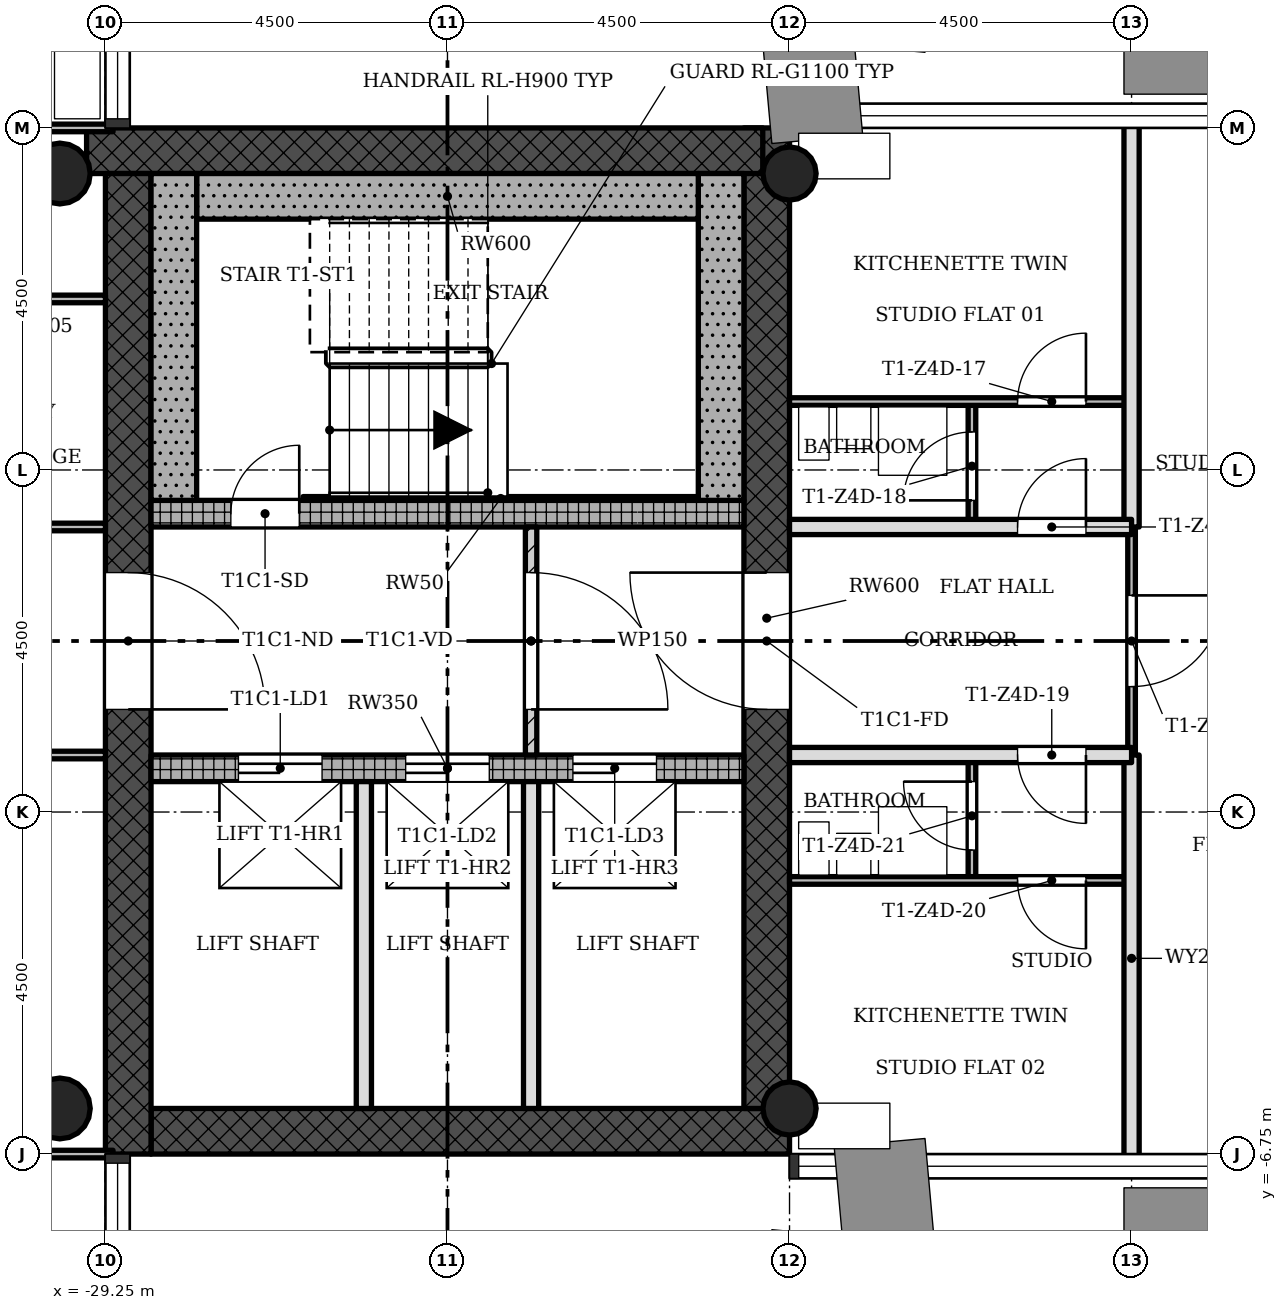
"""IFC4 building model, lengths in metres.
Left out: names, types, materials, properties, quantities, classifications, styles, units other than length and angle.
Written with IfcOpenShell. Run it as: python <this file> out.ifc"""

import sys

from ifc_helpers import new_model, si_unit, direction, frame, frame_2d, origin, origin_2d, place, context, subcontext, project, spatial, rectangle, hollow_circle, extrude, element, fill, save


model = new_model("IFC4")
c1 = context("Model", 3, precision=1e-05, world=origin(), true_north=direction((0.0, 1.0)))
c2 = subcontext(c1, "Body", "Model", "MODEL_VIEW")
j1 = project(units=[si_unit("LENGTHUNIT", "METRE"), si_unit("PLANEANGLEUNIT", "RADIAN")], contexts=[c1])
p1 = place(None, origin())
s1 = spatial("IfcSite", under=j1, at=p1, CompositionType="ELEMENT")
p2 = place(p1, origin())
s2 = spatial("IfcBuilding", under=s1, at=p2, CompositionType="ELEMENT")
p3 = place(p2, frame((0.0, 0.0, 202.8)))
s3 = spatial("IfcBuildingStorey", under=s2, at=p3, CompositionType="ELEMENT", Elevation=202.8)
p4 = place(p3, frame((-28.65, -6.45, 0.0), z_axis=(0.0, 0.0, 1.0), x_axis=(1.0, 0.0, 0.0)))
e1 = element("IfcWall", 1, at=p4, inside=s3, PredefinedType="SHEAR", context=c2, shape_type="SweptSolid", body=[
    extrude(rectangle(XDim=8.4, YDim=0.6, at=frame_2d((4.2, 0.0))), origin(), (0.0, 0.0, 1.0), 3.4),
])
p5 = place(p3, frame((-20.55, -6.15, 0.0), z_axis=(0.0, 0.0, 1.0), x_axis=(0.0, 1.0, 0.0)))
e2 = element("IfcWall", 2, at=p5, inside=s3, PredefinedType="SHEAR", context=c2, shape_type="SweptSolid", body=[
    extrude(rectangle(XDim=12.9, YDim=0.6, at=frame_2d((6.45, 0.0))), origin(), (0.0, 0.0, 1.0), 3.4),
])
p6 = place(p5, frame((5.25, 0.0, 0.0)))
e3 = element("IfcOpeningElement", 3, at=p6, cuts=e2, PredefinedType="OPENING", context=c2, shape_type="SweptSolid", body=[
    extrude(rectangle(XDim=1.8, YDim=2.1, at=frame_2d((0.9, 1.05))), frame((0.0, 0.31, 0.0), z_axis=(0.0, -1.0, 0.0), x_axis=(1.0, 0.0, 0.0)), (0.0, 0.0, 1.0), 0.62),
])
p7 = place(p3, frame((-20.602, 6.45, 0.0), z_axis=(0.0, 0.0, 1.0), x_axis=(-1.0, 0.0, 0.0)))
e4 = element("IfcWall", 4, at=p7, inside=s3, PredefinedType="SHEAR", context=c2, shape_type="SweptSolid", body=[
    extrude(rectangle(XDim=8.896, YDim=0.6, at=frame_2d((4.448, 0.0))), origin(), (0.0, 0.0, 1.0), 3.4),
])
p8 = place(p3, frame((-28.95, 6.15, 0.0), z_axis=(0.0, 0.0, 1.0), x_axis=(0.0, -1.0, 0.0)))
e5 = element("IfcWall", 5, at=p8, inside=s3, PredefinedType="SHEAR", context=c2, shape_type="SweptSolid", body=[
    extrude(rectangle(XDim=12.9, YDim=0.6, at=frame_2d((6.45, 0.0))), origin(), (0.0, 0.0, 1.0), 3.4),
])
p9 = place(p8, frame((5.25, 0.0, 0.0)))
e6 = element("IfcOpeningElement", 6, at=p9, cuts=e5, PredefinedType="OPENING", context=c2, shape_type="SweptSolid", body=[
    extrude(rectangle(XDim=1.8, YDim=2.1, at=frame_2d((0.9, 1.05))), frame((0.0, 0.31, 0.0), z_axis=(0.0, -1.0, 0.0), x_axis=(1.0, 0.0, 0.0)), (0.0, 0.0, 1.0), 0.62),
])
p10 = place(p3, frame((-28.65, -1.675, 0.0), z_axis=(0.0, 0.0, 1.0), x_axis=(1.0, 0.0, 0.0)))
e7 = element("IfcWall", 7, at=p10, inside=s3, PredefinedType="SHEAR", context=c2, shape_type="SweptSolid", body=[
    extrude(rectangle(XDim=7.8, YDim=0.35, at=frame_2d((3.9, 0.0))), origin(), (0.0, 0.0, 1.0), 3.4),
])
p11 = place(p10, frame((1.15, 0.0, 0.0)))
e8 = element("IfcOpeningElement", 8, at=p11, cuts=e7, PredefinedType="OPENING", context=c2, shape_type="SweptSolid", body=[
    extrude(rectangle(XDim=1.1, YDim=2.1, at=frame_2d((0.55, 1.05))), frame((0.0, 0.185, 0.0), z_axis=(0.0, -1.0, 0.0), x_axis=(1.0, 0.0, 0.0)), (0.0, 0.0, 1.0), 0.37),
])
p12 = place(p10, frame((3.35, 0.0, 0.0)))
e9 = element("IfcOpeningElement", 9, at=p12, cuts=e7, PredefinedType="OPENING", context=c2, shape_type="SweptSolid", body=[
    extrude(rectangle(XDim=1.1, YDim=2.1, at=frame_2d((0.55, 1.05))), frame((0.0, 0.185, 0.0), z_axis=(0.0, -1.0, 0.0), x_axis=(1.0, 0.0, 0.0)), (0.0, 0.0, 1.0), 0.37),
])
p13 = place(p10, frame((5.55, 0.0, 0.0)))
e10 = element("IfcOpeningElement", 10, at=p13, cuts=e7, PredefinedType="OPENING", context=c2, shape_type="SweptSolid", body=[
    extrude(rectangle(XDim=1.1, YDim=2.1, at=frame_2d((0.55, 1.05))), frame((0.0, 0.185, 0.0), z_axis=(0.0, -1.0, 0.0), x_axis=(1.0, 0.0, 0.0)), (0.0, 0.0, 1.0), 0.37),
])
p14 = place(p3, frame((-28.65, 1.675, 0.0), z_axis=(0.0, 0.0, 1.0), x_axis=(1.0, 0.0, 0.0)))
e11 = element("IfcWall", 11, at=p14, inside=s3, PredefinedType="SHEAR", context=c2, shape_type="SweptSolid", body=[
    extrude(rectangle(XDim=7.8, YDim=0.35, at=frame_2d((3.9, 0.0))), origin(), (0.0, 0.0, 1.0), 3.4),
])
p15 = place(p14, frame((1.05, 0.0, 0.0)))
e12 = element("IfcOpeningElement", 12, at=p15, cuts=e11, PredefinedType="OPENING", context=c2, shape_type="SweptSolid", body=[
    extrude(rectangle(XDim=0.9, YDim=2.1, at=frame_2d((0.45, 1.05))), frame((0.0, 0.185, 0.0), z_axis=(0.0, -1.0, 0.0), x_axis=(1.0, 0.0, 0.0)), (0.0, 0.0, 1.0), 0.37),
])
for number, where, z_axis, x_axis in (
    (13, (-20.25, -6.15, 0.0), (0.0, 0.0, 1.0), (1.0, 0.0, 0.0)),
    (14, (-20.25, 6.15, 0.0), (0.0, 0.0, 1.0), (1.0, 0.0, 0.0)),
):
    element("IfcColumn", number, at=place(p3, frame(where, z_axis=z_axis, x_axis=x_axis)), inside=s3, PredefinedType="COLUMN", context=c2, shape_type="SweptSolid", body=[
        extrude(hollow_circle(Radius=0.35, WallThickness=0.025, at=origin_2d()), origin(), (0.0, 0.0, 1.0), 3.4),
    ])
for number, where, z_axis, x_axis in (
    (15, (-29.85, -6.15, 0.0), (0.0, 0.0, 1.0), (1.0, 0.0, 0.0)),
    (16, (-29.85, 6.15, 0.0), (0.0, 0.0, 1.0), (1.0, 0.0, 0.0)),
):
    element("IfcColumn", number, at=place(p3, frame(where, z_axis=z_axis, x_axis=x_axis)), inside=s3, PredefinedType="COLUMN", context=c2, shape_type="SweptSolid", body=[
        extrude(hollow_circle(Radius=0.4, WallThickness=0.028, at=origin_2d()), origin(), (0.0, 0.0, 1.0), 3.4),
    ])
p16 = place(p3, frame((-23.65, -1.5, 0.0), z_axis=(0.0, 0.0, 1.0), x_axis=(0.0, 1.0, 0.0)))
e17 = element("IfcWall", 17, at=p16, inside=s3, PredefinedType="PARTITIONING", context=c2, shape_type="SweptSolid", body=[
    extrude(rectangle(XDim=3.0, YDim=0.15, at=frame_2d((1.5, 0.0))), origin(), (0.0, 0.0, 1.0), 3.0),
])
p17 = place(p16, frame((0.6, 0.0, 0.0)))
e18 = element("IfcOpeningElement", 18, at=p17, cuts=e17, PredefinedType="OPENING", context=c2, shape_type="SweptSolid", body=[
    extrude(rectangle(XDim=1.8, YDim=2.1, at=frame_2d((0.9, 1.05))), frame((0.0, 0.085, 0.0), z_axis=(0.0, -1.0, 0.0), x_axis=(1.0, 0.0, 0.0)), (0.0, 0.0, 1.0), 0.17),
])
for number, where, z_axis, x_axis in (
    (19, (-25.85, -6.15, 0.0), (0.0, 0.0, 1.0), (0.0, 1.0, 0.0)),
    (20, (-23.65, -6.15, 0.0), (0.0, 0.0, 1.0), (0.0, 1.0, 0.0)),
):
    element("IfcWall", number, at=place(p3, frame(where, z_axis=z_axis, x_axis=x_axis)), inside=s3, PredefinedType="SOLIDWALL", context=c2, shape_type="SweptSolid", body=[
        extrude(rectangle(XDim=4.3, YDim=0.2, at=frame_2d((2.15, 0.0))), origin(), (0.0, 0.0, 1.0), 3.0),
    ])
p18 = place(p3, frame((-17.85, -3.15, 0.0), z_axis=(0.0, 0.0, 1.0), x_axis=(0.0, 1.0, 0.0)))
e21 = element("IfcWall", 21, at=p18, inside=s3, PredefinedType="PARTITIONING", context=c2, shape_type="SweptSolid", body=[
    extrude(rectangle(XDim=1.65, YDim=0.1, at=frame_2d((0.825, 0.0))), origin(), (0.0, 0.0, 1.0), 3.0),
])
p19 = place(p18, frame((0.4, 0.0, 0.0)))
e22 = element("IfcOpeningElement", 22, at=p19, cuts=e21, PredefinedType="OPENING", context=c2, shape_type="SweptSolid", body=[
    extrude(rectangle(XDim=0.9, YDim=2.1, at=frame_2d((0.45, 1.05))), frame((0.0, 0.06, 0.0), z_axis=(0.0, -1.0, 0.0), x_axis=(1.0, 0.0, 0.0)), (0.0, 0.0, 1.0), 0.12),
])
p20 = place(p3, frame((-17.85, 1.5, 0.0), z_axis=(0.0, 0.0, 1.0), x_axis=(0.0, 1.0, 0.0)))
e23 = element("IfcWall", 23, at=p20, inside=s3, PredefinedType="PARTITIONING", context=c2, shape_type="SweptSolid", body=[
    extrude(rectangle(XDim=1.65, YDim=0.1, at=frame_2d((0.825, 0.0))), origin(), (0.0, 0.0, 1.0), 3.0),
])
p21 = place(p20, frame((0.35, 0.0, 0.0)))
e24 = element("IfcOpeningElement", 24, at=p21, cuts=e23, PredefinedType="OPENING", context=c2, shape_type="SweptSolid", body=[
    extrude(rectangle(XDim=0.9, YDim=2.1, at=frame_2d((0.45, 1.05))), frame((0.0, 0.06, 0.0), z_axis=(0.0, -1.0, 0.0), x_axis=(1.0, 0.0, 0.0)), (0.0, 0.0, 1.0), 0.12),
])
p22 = place(p3, frame((-15.75, -1.5, 0.0), z_axis=(0.0, 0.0, 1.0), x_axis=(0.0, 1.0, 0.0)))
e25 = element("IfcWall", 25, at=p22, inside=s3, PredefinedType="PARTITIONING", context=c2, shape_type="SweptSolid", body=[
    extrude(rectangle(XDim=3.0, YDim=0.1, at=frame_2d((1.5, 0.0))), origin(), (0.0, 0.0, 1.0), 3.0),
])
p23 = place(p22, frame((0.9, 0.0, 0.0)))
e26 = element("IfcOpeningElement", 26, at=p23, cuts=e25, PredefinedType="OPENING", context=c2, shape_type="SweptSolid", body=[
    extrude(rectangle(XDim=1.2, YDim=2.1, at=frame_2d((0.6, 1.05))), frame((0.0, 0.06, 0.0), z_axis=(0.0, -1.0, 0.0), x_axis=(1.0, 0.0, 0.0)), (0.0, 0.0, 1.0), 0.12),
])
for number, where, z_axis, x_axis in (
    (27, (-15.75, -6.85, 0.0), (0.0, 0.0, 1.0), (0.0, 1.0, 0.0)),
    (28, (-15.75, 1.5, 0.0), (0.0, 0.0, 1.0), (0.0, 1.0, 0.0)),
):
    element("IfcWall", number, at=place(p3, frame(where, z_axis=z_axis, x_axis=x_axis)), inside=s3, PredefinedType="SOLIDWALL", context=c2, shape_type="SweptSolid", body=[
        extrude(rectangle(XDim=5.35, YDim=0.2, at=frame_2d((2.675, 0.0))), origin(), (0.0, 0.0, 1.0), 3.0),
    ])
p24 = place(p3, frame((-35.1, -6.75, 0.0), z_axis=(0.0, 0.0, 1.0), x_axis=(1.0, 0.0, 0.0)))
e29 = element("IfcWall", 29, at=p24, inside=s3, PredefinedType="PARTITIONING", context=c2, shape_type="SweptSolid", body=[
    extrude(rectangle(XDim=5.95, YDim=0.1, at=frame_2d((2.975, 0.0))), origin(), (0.0, 0.0, 1.0), 3.0),
])
p25 = place(p3, frame((-20.25, -3.15, 0.0), z_axis=(0.0, 0.0, 1.0), x_axis=(1.0, 0.0, 0.0)))
e30 = element("IfcWall", 30, at=p25, inside=s3, PredefinedType="PARTITIONING", context=c2, shape_type="SweptSolid", body=[
    extrude(rectangle(XDim=4.5, YDim=0.1, at=frame_2d((2.25, 0.0))), origin(), (0.0, 0.0, 1.0), 3.0),
])
p26 = place(p25, frame((3.0, 0.0, 0.0)))
e31 = element("IfcOpeningElement", 31, at=p26, cuts=e30, PredefinedType="OPENING", context=c2, shape_type="SweptSolid", body=[
    extrude(rectangle(XDim=0.9, YDim=2.1, at=frame_2d((0.45, 1.05))), frame((0.0, 0.06, 0.0), z_axis=(0.0, -1.0, 0.0), x_axis=(1.0, 0.0, 0.0)), (0.0, 0.0, 1.0), 0.12),
])
p27 = place(p3, frame((-31.5, -1.5, 0.0), z_axis=(0.0, 0.0, 1.0), x_axis=(1.0, 0.0, 0.0)))
e32 = element("IfcWall", 32, at=p27, inside=s3, PredefinedType="PARTITIONING", context=c2, shape_type="SweptSolid", body=[
    extrude(rectangle(XDim=2.25, YDim=0.1, at=frame_2d((1.125, 0.0))), origin(), (0.0, 0.0, 1.0), 3.0),
])
p28 = place(p3, frame((-20.25, -1.5, 0.0), z_axis=(0.0, 0.0, 1.0), x_axis=(1.0, 0.0, 0.0)))
e33 = element("IfcWall", 33, at=p28, inside=s3, PredefinedType="SOLIDWALL", context=c2, shape_type="SweptSolid", body=[
    extrude(rectangle(XDim=4.5, YDim=0.2, at=frame_2d((2.25, 0.0))), origin(), (0.0, 0.0, 1.0), 3.0),
])
p29 = place(p28, frame((3.0, 0.0, 0.0)))
e34 = element("IfcOpeningElement", 34, at=p29, cuts=e33, PredefinedType="OPENING", context=c2, shape_type="SweptSolid", body=[
    extrude(rectangle(XDim=0.9, YDim=2.1, at=frame_2d((0.45, 1.05))), frame((0.0, 0.11, 0.0), z_axis=(0.0, -1.0, 0.0), x_axis=(1.0, 0.0, 0.0)), (0.0, 0.0, 1.0), 0.22),
])
p30 = place(p3, frame((-31.5, 1.5, 0.0), z_axis=(0.0, 0.0, 1.0), x_axis=(1.0, 0.0, 0.0)))
e35 = element("IfcWall", 35, at=p30, inside=s3, PredefinedType="PARTITIONING", context=c2, shape_type="SweptSolid", body=[
    extrude(rectangle(XDim=2.25, YDim=0.1, at=frame_2d((1.125, 0.0))), origin(), (0.0, 0.0, 1.0), 3.0),
])
p31 = place(p3, frame((-20.25, 1.5, 0.0), z_axis=(0.0, 0.0, 1.0), x_axis=(1.0, 0.0, 0.0)))
e36 = element("IfcWall", 36, at=p31, inside=s3, PredefinedType="SOLIDWALL", context=c2, shape_type="SweptSolid", body=[
    extrude(rectangle(XDim=4.5, YDim=0.2, at=frame_2d((2.25, 0.0))), origin(), (0.0, 0.0, 1.0), 3.0),
])
p32 = place(p31, frame((3.0, 0.0, 0.0)))
e37 = element("IfcOpeningElement", 37, at=p32, cuts=e36, PredefinedType="OPENING", context=c2, shape_type="SweptSolid", body=[
    extrude(rectangle(XDim=0.9, YDim=2.1, at=frame_2d((0.45, 1.05))), frame((0.0, 0.11, 0.0), z_axis=(0.0, -1.0, 0.0), x_axis=(1.0, 0.0, 0.0)), (0.0, 0.0, 1.0), 0.22),
])
p33 = place(p3, frame((-20.25, 3.15, 0.0), z_axis=(0.0, 0.0, 1.0), x_axis=(1.0, 0.0, 0.0)))
e38 = element("IfcWall", 38, at=p33, inside=s3, PredefinedType="PARTITIONING", context=c2, shape_type="SweptSolid", body=[
    extrude(rectangle(XDim=4.5, YDim=0.1, at=frame_2d((2.25, 0.0))), origin(), (0.0, 0.0, 1.0), 3.0),
])
p34 = place(p33, frame((3.0, 0.0, 0.0)))
e39 = element("IfcOpeningElement", 39, at=p34, cuts=e38, PredefinedType="OPENING", context=c2, shape_type="SweptSolid", body=[
    extrude(rectangle(XDim=0.9, YDim=2.1, at=frame_2d((0.45, 1.05))), frame((0.0, 0.06, 0.0), z_axis=(0.0, -1.0, 0.0), x_axis=(1.0, 0.0, 0.0)), (0.0, 0.0, 1.0), 0.12),
])
p35 = place(p3, frame((-35.1, 4.5, 0.0), z_axis=(0.0, 0.0, 1.0), x_axis=(1.0, 0.0, 0.0)))
e40 = element("IfcWall", 40, at=p35, inside=s3, PredefinedType="PARTITIONING", context=c2, shape_type="SweptSolid", body=[
    extrude(rectangle(XDim=5.85, YDim=0.1, at=frame_2d((2.925, 0.0))), origin(), (0.0, 0.0, 1.0), 3.0),
])
p36 = place(p35, frame((1.35, 0.0, 0.0)))
e41 = element("IfcOpeningElement", 41, at=p36, cuts=e40, PredefinedType="OPENING", context=c2, shape_type="SweptSolid", body=[
    extrude(rectangle(XDim=0.9, YDim=2.1, at=frame_2d((0.45, 1.05))), frame((0.0, 0.06, 0.0), z_axis=(0.0, -1.0, 0.0), x_axis=(1.0, 0.0, 0.0)), (0.0, 0.0, 1.0), 0.12),
])
p37 = place(p3, frame((-35.1, 6.75, 0.0), z_axis=(0.0, 0.0, 1.0), x_axis=(1.0, 0.0, 0.0)))
e42 = element("IfcWall", 42, at=p37, inside=s3, PredefinedType="PARTITIONING", context=c2, shape_type="SweptSolid", body=[
    extrude(rectangle(XDim=5.95, YDim=0.1, at=frame_2d((2.975, 0.0))), origin(), (0.0, 0.0, 1.0), 3.0),
])
p38 = place(p3, frame((-21.15, 1.85, 0.0), z_axis=(0.0, 0.0, 1.0), x_axis=(0.0, 1.0, 0.0)))
e43 = element("IfcWall", 43, at=p38, inside=s3, PredefinedType="SHEAR", context=c2, shape_type="SweptSolid", body=[
    extrude(rectangle(XDim=4.3, YDim=0.6, at=frame_2d((2.15, 0.0))), origin(), (0.0, 0.0, 1.0), 3.4),
])
p39 = place(p3, frame((-28.05, 5.85, 0.0), z_axis=(0.0, 0.0, 1.0), x_axis=(1.0, 0.0, 0.0)))
e44 = element("IfcWall", 44, at=p39, inside=s3, PredefinedType="SHEAR", context=c2, shape_type="SweptSolid", body=[
    extrude(rectangle(XDim=6.6, YDim=0.6, at=frame_2d((3.3, 0.0))), origin(), (0.0, 0.0, 1.0), 3.4),
])
p40 = place(p3, frame((-28.35, 1.85, 0.0), z_axis=(0.0, 0.0, 1.0), x_axis=(0.0, 1.0, 0.0)))
e45 = element("IfcWall", 45, at=p40, inside=s3, PredefinedType="SHEAR", context=c2, shape_type="SweptSolid", body=[
    extrude(rectangle(XDim=4.3, YDim=0.6, at=frame_2d((2.15, 0.0))), origin(), (0.0, 0.0, 1.0), 3.4),
])
p41 = place(p3, frame((-26.65, 1.875, 0.0), z_axis=(0.0, 0.0, 1.0), x_axis=(1.0, 0.0, 0.0)))
e46 = element("IfcWall", 46, at=p41, inside=s3, PredefinedType="SHEAR", context=c2, shape_type="SweptSolid", body=[
    extrude(rectangle(XDim=5.2, YDim=0.05, at=frame_2d((2.6, 0.0))), origin(), (0.0, 0.0, 1.0), 3.4),
])
p42 = place(p17, origin())
e47 = element("IfcDoor", 47, at=p42, inside=s3, OperationType="SINGLE_SWING_LEFT", PredefinedType="DOOR", context=c2, shape_type="SweptSolid", body=[
    extrude(rectangle(XDim=1.8, YDim=2.1, at=frame_2d((0.9, 1.05))), frame((0.0, 0.025, 0.0), z_axis=(0.0, -1.0, 0.0), x_axis=(1.0, 0.0, 0.0)), (0.0, 0.0, 1.0), 0.05),
])
fill(e18, e47)
p43 = place(p32, origin())
e48 = element("IfcDoor", 48, at=p43, inside=s3, OperationType="SINGLE_SWING_LEFT", PredefinedType="DOOR", context=c2, shape_type="SweptSolid", body=[
    extrude(rectangle(XDim=0.9, YDim=2.1, at=frame_2d((0.45, 1.05))), frame((0.0, 0.025, 0.0), z_axis=(0.0, -1.0, 0.0), x_axis=(1.0, 0.0, 0.0)), (0.0, 0.0, 1.0), 0.05),
])
fill(e37, e48)
p44 = place(p34, origin())
e49 = element("IfcDoor", 49, at=p44, inside=s3, OperationType="SINGLE_SWING_LEFT", PredefinedType="DOOR", context=c2, shape_type="SweptSolid", body=[
    extrude(rectangle(XDim=0.9, YDim=2.1, at=frame_2d((0.45, 1.05))), frame((0.0, 0.025, 0.0), z_axis=(0.0, -1.0, 0.0), x_axis=(1.0, 0.0, 0.0)), (0.0, 0.0, 1.0), 0.05),
])
fill(e39, e49)
p45 = place(p21, origin())
e50 = element("IfcDoor", 50, at=p45, inside=s3, OperationType="SINGLE_SWING_RIGHT", PredefinedType="DOOR", context=c2, shape_type="SweptSolid", body=[
    extrude(rectangle(XDim=0.9, YDim=2.1, at=frame_2d((0.45, 1.05))), frame((0.0, 0.025, 0.0), z_axis=(0.0, -1.0, 0.0), x_axis=(1.0, 0.0, 0.0)), (0.0, 0.0, 1.0), 0.05),
])
fill(e24, e50)
p46 = place(p29, origin())
e51 = element("IfcDoor", 51, at=p46, inside=s3, OperationType="SINGLE_SWING_RIGHT", PredefinedType="DOOR", context=c2, shape_type="SweptSolid", body=[
    extrude(rectangle(XDim=0.9, YDim=2.1, at=frame_2d((0.45, 1.05))), frame((0.0, 0.025, 0.0), z_axis=(0.0, -1.0, 0.0), x_axis=(1.0, 0.0, 0.0)), (0.0, 0.0, 1.0), 0.05),
])
fill(e34, e51)
p47 = place(p26, origin())
e52 = element("IfcDoor", 52, at=p47, inside=s3, OperationType="SINGLE_SWING_RIGHT", PredefinedType="DOOR", context=c2, shape_type="SweptSolid", body=[
    extrude(rectangle(XDim=0.9, YDim=2.1, at=frame_2d((0.45, 1.05))), frame((0.0, 0.025, 0.0), z_axis=(0.0, -1.0, 0.0), x_axis=(1.0, 0.0, 0.0)), (0.0, 0.0, 1.0), 0.05),
])
fill(e31, e52)
p48 = place(p19, origin())
e53 = element("IfcDoor", 53, at=p48, inside=s3, OperationType="SINGLE_SWING_LEFT", PredefinedType="DOOR", context=c2, shape_type="SweptSolid", body=[
    extrude(rectangle(XDim=0.9, YDim=2.1, at=frame_2d((0.45, 1.05))), frame((0.0, 0.025, 0.0), z_axis=(0.0, -1.0, 0.0), x_axis=(1.0, 0.0, 0.0)), (0.0, 0.0, 1.0), 0.05),
])
fill(e22, e53)
p49 = place(p23, origin())
e54 = element("IfcDoor", 54, at=p49, inside=s3, OperationType="SINGLE_SWING_RIGHT", PredefinedType="DOOR", context=c2, shape_type="SweptSolid", body=[
    extrude(rectangle(XDim=1.2, YDim=2.1, at=frame_2d((0.6, 1.05))), frame((0.0, 0.025, 0.0), z_axis=(0.0, -1.0, 0.0), x_axis=(1.0, 0.0, 0.0)), (0.0, 0.0, 1.0), 0.05),
])
fill(e26, e54)
p50 = place(p15, origin())
e55 = element("IfcDoor", 55, at=p50, inside=s3, OperationType="SINGLE_SWING_LEFT", PredefinedType="DOOR", context=c2, shape_type="SweptSolid", body=[
    extrude(rectangle(XDim=0.9, YDim=2.1, at=frame_2d((0.45, 1.05))), frame((0.0, 0.025, 0.0), z_axis=(0.0, -1.0, 0.0), x_axis=(1.0, 0.0, 0.0)), (0.0, 0.0, 1.0), 0.05),
])
fill(e12, e55)
p51 = place(p11, origin())
e56 = element("IfcDoor", 56, at=p51, inside=s3, OperationType="SLIDING_TO_LEFT", PredefinedType="DOOR", context=c2, shape_type="SweptSolid", body=[
    extrude(rectangle(XDim=1.1, YDim=2.1, at=frame_2d((0.55, 1.05))), frame((0.0, 0.025, 0.0), z_axis=(0.0, -1.0, 0.0), x_axis=(1.0, 0.0, 0.0)), (0.0, 0.0, 1.0), 0.05),
])
fill(e8, e56)
p52 = place(p12, origin())
e57 = element("IfcDoor", 57, at=p52, inside=s3, OperationType="SLIDING_TO_LEFT", PredefinedType="DOOR", context=c2, shape_type="SweptSolid", body=[
    extrude(rectangle(XDim=1.1, YDim=2.1, at=frame_2d((0.55, 1.05))), frame((0.0, 0.025, 0.0), z_axis=(0.0, -1.0, 0.0), x_axis=(1.0, 0.0, 0.0)), (0.0, 0.0, 1.0), 0.05),
])
fill(e9, e57)
p53 = place(p13, origin())
e58 = element("IfcDoor", 58, at=p53, inside=s3, OperationType="SLIDING_TO_LEFT", PredefinedType="DOOR", context=c2, shape_type="SweptSolid", body=[
    extrude(rectangle(XDim=1.1, YDim=2.1, at=frame_2d((0.55, 1.05))), frame((0.0, 0.025, 0.0), z_axis=(0.0, -1.0, 0.0), x_axis=(1.0, 0.0, 0.0)), (0.0, 0.0, 1.0), 0.05),
])
fill(e10, e58)
p54 = place(p9, origin())
e59 = element("IfcDoor", 59, at=p54, inside=s3, OperationType="SINGLE_SWING_LEFT", PredefinedType="DOOR", context=c2, shape_type="SweptSolid", body=[
    extrude(rectangle(XDim=1.8, YDim=2.1, at=frame_2d((0.9, 1.05))), frame((0.0, 0.025, 0.0), z_axis=(0.0, -1.0, 0.0), x_axis=(1.0, 0.0, 0.0)), (0.0, 0.0, 1.0), 0.05),
])
fill(e6, e59)
p55 = place(p6, origin())
e60 = element("IfcDoor", 60, at=p55, inside=s3, OperationType="SINGLE_SWING_LEFT", PredefinedType="DOOR", context=c2, shape_type="SweptSolid", body=[
    extrude(rectangle(XDim=1.8, YDim=2.1, at=frame_2d((0.9, 1.05))), frame((0.0, 0.025, 0.0), z_axis=(0.0, -1.0, 0.0), x_axis=(1.0, 0.0, 0.0)), (0.0, 0.0, 1.0), 0.05),
])
fill(e3, e60)
save(model, sys.argv[1])
